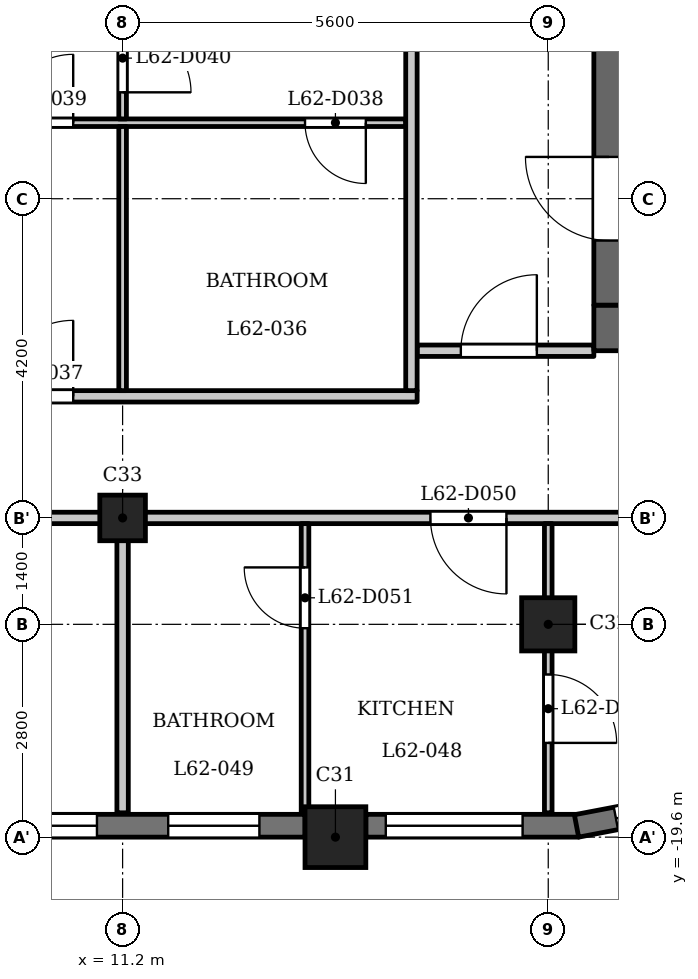
"""IFC4 building model, lengths in metres.
Left out: names, types, materials, properties, quantities, classifications, styles, units other than length and angle.
Written with IfcOpenShell. Run it as: python <this file> out.ifc"""

import sys

from ifc_helpers import new_model, si_unit, direction, frame, frame_2d, origin, origin_2d, place, context, subcontext, project, spatial, rectangle, extrude, element, fill, save


model = new_model("IFC4")
c1 = context("Model", 3, precision=1e-05, world=origin(), true_north=direction((0.0, 1.0)))
c2 = subcontext(c1, "Body", "Model", "MODEL_VIEW")
j1 = project(units=[si_unit("LENGTHUNIT", "METRE"), si_unit("PLANEANGLEUNIT", "RADIAN")], contexts=[c1])
p1 = place(None, origin())
s1 = spatial("IfcSite", under=j1, at=p1, CompositionType="ELEMENT")
p2 = place(p1, origin())
s2 = spatial("IfcBuilding", under=s1, at=p2, CompositionType="ELEMENT")
p3 = place(p2, frame((0.0, 0.0, 241.7)))
s3 = spatial("IfcBuildingStorey", under=s2, at=p3, CompositionType="ELEMENT", Elevation=241.7)
p4 = place(p3, frame((14.0, -19.6, 0.0), z_axis=(0.0, 0.0, 1.0), x_axis=(1.0, 0.0, 0.0)))
e1 = element("IfcColumn", 1, at=p4, inside=s3, PredefinedType="COLUMN", context=c2, shape_type="SweptSolid", body=[
    extrude(rectangle(XDim=0.8, YDim=0.8, at=origin_2d()), origin(), (0.0, 0.0, 1.0), 3.5),
])
p5 = place(p3, frame((16.8, -16.8, 0.0), z_axis=(0.0, 0.0, 1.0), x_axis=(1.0, 0.0, 0.0)))
e2 = element("IfcColumn", 2, at=p5, inside=s3, PredefinedType="COLUMN", context=c2, shape_type="SweptSolid", body=[
    extrude(rectangle(XDim=0.7, YDim=0.7, at=origin_2d()), origin(), (0.0, 0.0, 1.0), 3.5),
])
p6 = place(p3, frame((11.2, -15.4, 0.0), z_axis=(0.0, 0.0, 1.0), x_axis=(1.0, 0.0, 0.0)))
e3 = element("IfcColumn", 3, at=p6, inside=s3, PredefinedType="COLUMN", context=c2, shape_type="SweptSolid", body=[
    extrude(rectangle(XDim=0.6, YDim=0.6, at=origin_2d()), origin(), (0.0, 0.0, 1.0), 3.5),
])
p7 = place(p3, frame((8.8, -19.45, 0.0), z_axis=(0.0, 0.0, 1.0), x_axis=(1.0, 0.0, 0.0)))
e4 = element("IfcWall", 4, at=p7, inside=s3, PredefinedType="SOLIDWALL", context=c2, shape_type="SweptSolid", body=[
    extrude(rectangle(XDim=4.8, YDim=0.3, at=frame_2d((2.4, 0.0))), origin(), (0.0, 0.0, 1.0), 2.55),
])
p8 = place(p7, frame((0.262, 0.0, 0.9)))
e5 = element("IfcOpeningElement", 5, at=p8, cuts=e4, PredefinedType="OPENING", context=c2, shape_type="SweptSolid", body=[
    extrude(rectangle(XDim=1.8, YDim=1.25, at=frame_2d((0.9, 0.625))), frame((0.0, 0.16, 0.0), z_axis=(0.0, -1.0, 0.0), x_axis=(1.0, 0.0, 0.0)), (0.0, 0.0, 1.0), 0.32),
])
p9 = place(p7, frame((3.0, 0.0, 0.6)))
e6 = element("IfcOpeningElement", 6, at=p9, cuts=e4, PredefinedType="OPENING", context=c2, shape_type="SweptSolid", body=[
    extrude(rectangle(XDim=1.2, YDim=1.55, at=frame_2d((0.6, 0.775))), frame((0.0, 0.16, 0.0), z_axis=(0.0, -1.0, 0.0), x_axis=(1.0, 0.0, 0.0)), (0.0, 0.0, 1.0), 0.32),
])
p10 = place(p3, frame((14.4, -19.45, 0.0), z_axis=(0.0, 0.0, 1.0), x_axis=(1.0, 0.0, 0.0)))
e7 = element("IfcWall", 7, at=p10, inside=s3, PredefinedType="SOLIDWALL", context=c2, shape_type="SweptSolid", body=[
    extrude(rectangle(XDim=2.8, YDim=0.3, at=frame_2d((1.4, 0.0))), origin(), (0.0, 0.0, 1.0), 2.55),
])
p11 = place(p10, frame((0.262, 0.0, 0.9)))
e8 = element("IfcOpeningElement", 8, at=p11, cuts=e7, PredefinedType="OPENING", context=c2, shape_type="SweptSolid", body=[
    extrude(rectangle(XDim=1.8, YDim=1.25, at=frame_2d((0.9, 0.625))), frame((0.0, 0.16, 0.0), z_axis=(0.0, -1.0, 0.0), x_axis=(1.0, 0.0, 0.0)), (0.0, 0.0, 1.0), 0.32),
])
p12 = place(p3, frame((17.172, -19.453, 0.0), z_axis=(0.0, 0.0, 1.0), x_axis=(0.982301706131, 0.187305520826, 0.0)))
e9 = element("IfcWall", 9, at=p12, inside=s3, PredefinedType="SOLIDWALL", context=c2, shape_type="SweptSolid", body=[
    extrude(rectangle(XDim=1.856, YDim=0.3, at=frame_2d((0.928, 0.0))), origin(), (0.0, 0.0, 1.0), 2.55),
])
p13 = place(p12, frame((0.528, 0.0, 0.6)))
e10 = element("IfcOpeningElement", 10, at=p13, cuts=e9, PredefinedType="OPENING", context=c2, shape_type="SweptSolid", body=[
    extrude(rectangle(XDim=0.8, YDim=1.55, at=frame_2d((0.4, 0.775))), frame((0.0, 0.16, 0.0), z_axis=(0.0, -1.0, 0.0), x_axis=(1.0, 0.0, 0.0)), (0.0, 0.0, 1.0), 0.32),
])
p14 = place(p3, frame((17.4, -12.9, 0.0), z_axis=(0.0, 0.0, 1.0), x_axis=(1.0, 0.0, 0.0)))
e11 = element("IfcWall", 11, at=p14, inside=s3, PredefinedType="SHEAR", context=c2, shape_type="SweptSolid", body=[
    extrude(rectangle(XDim=7.32, YDim=0.6, at=frame_2d((3.66, 0.0))), origin(), (0.0, 0.0, 1.0), 3.2),
])
p15 = place(p3, frame((17.6, -12.6, 0.0), z_axis=(0.0, 0.0, 1.0), x_axis=(0.0, 1.0, 0.0)))
e12 = element("IfcWall", 12, at=p15, inside=s3, PredefinedType="SHEAR", context=c2, shape_type="SweptSolid", body=[
    extrude(rectangle(XDim=25.2, YDim=0.4, at=frame_2d((12.6, 0.0))), origin(), (0.0, 0.0, 1.0), 3.2),
])
p16 = place(p15, frame((6.3, 0.0, 0.0)))
e13 = element("IfcOpeningElement", 13, at=p16, cuts=e12, PredefinedType="OPENING", context=c2, shape_type="SweptSolid", body=[
    extrude(rectangle(XDim=1.1, YDim=2.1, at=frame_2d((0.55, 1.05))), frame((0.0, 0.21, 0.0), z_axis=(0.0, -1.0, 0.0), x_axis=(1.0, 0.0, 0.0)), (0.0, 0.0, 1.0), 0.42),
])
p17 = place(p15, frame((8.7, 0.0, 0.0)))
e14 = element("IfcOpeningElement", 14, at=p17, cuts=e12, PredefinedType="OPENING", context=c2, shape_type="SweptSolid", body=[
    extrude(rectangle(XDim=1.1, YDim=2.1, at=frame_2d((0.55, 1.05))), frame((0.0, 0.21, 0.0), z_axis=(0.0, -1.0, 0.0), x_axis=(1.0, 0.0, 0.0)), (0.0, 0.0, 1.0), 0.42),
])
p18 = place(p15, frame((11.2, 0.0, 0.0)))
e15 = element("IfcOpeningElement", 15, at=p18, cuts=e12, PredefinedType="OPENING", context=c2, shape_type="SweptSolid", body=[
    extrude(rectangle(XDim=0.9, YDim=2.1, at=frame_2d((0.45, 1.05))), frame((0.0, 0.21, 0.0), z_axis=(0.0, -1.0, 0.0), x_axis=(1.0, 0.0, 0.0)), (0.0, 0.0, 1.0), 0.42),
])
p19 = place(p15, frame((15.75, 0.0, 0.0)))
e16 = element("IfcOpeningElement", 16, at=p19, cuts=e12, PredefinedType="OPENING", context=c2, shape_type="SweptSolid", body=[
    extrude(rectangle(XDim=1.1, YDim=2.1, at=frame_2d((0.55, 1.05))), frame((0.0, 0.21, 0.0), z_axis=(0.0, -1.0, 0.0), x_axis=(1.0, 0.0, 0.0)), (0.0, 0.0, 1.0), 0.42),
])
p20 = place(p15, frame((18.15, 0.0, 0.0)))
e17 = element("IfcOpeningElement", 17, at=p20, cuts=e12, PredefinedType="OPENING", context=c2, shape_type="SweptSolid", body=[
    extrude(rectangle(XDim=1.1, YDim=2.1, at=frame_2d((0.55, 1.05))), frame((0.0, 0.21, 0.0), z_axis=(0.0, -1.0, 0.0), x_axis=(1.0, 0.0, 0.0)), (0.0, 0.0, 1.0), 0.42),
])
p21 = place(p15, frame((23.25, 0.0, 0.0)))
e18 = element("IfcOpeningElement", 18, at=p21, cuts=e12, PredefinedType="OPENING", context=c2, shape_type="SweptSolid", body=[
    extrude(rectangle(XDim=1.1, YDim=2.1, at=frame_2d((0.55, 1.05))), frame((0.0, 0.21, 0.0), z_axis=(0.0, -1.0, 0.0), x_axis=(1.0, 0.0, 0.0)), (0.0, 0.0, 1.0), 0.42),
])
p22 = place(p15, frame((0.85, 0.0, 0.0)))
e19 = element("IfcOpeningElement", 19, at=p22, cuts=e12, PredefinedType="OPENING", context=c2, shape_type="SweptSolid", body=[
    extrude(rectangle(XDim=1.1, YDim=2.1, at=frame_2d((0.55, 1.05))), frame((0.0, 0.21, 0.0), z_axis=(0.0, -1.0, 0.0), x_axis=(1.0, 0.0, 0.0)), (0.0, 0.0, 1.0), 0.42),
])
p23 = place(p15, frame((13.075, 0.0, 0.0)))
e20 = element("IfcOpeningElement", 20, at=p23, cuts=e12, PredefinedType="OPENING", context=c2, shape_type="SweptSolid", body=[
    extrude(rectangle(XDim=1.8, YDim=2.1, at=frame_2d((0.9, 1.05))), frame((0.0, 0.21, 0.0), z_axis=(0.0, -1.0, 0.0), x_axis=(1.0, 0.0, 0.0)), (0.0, 0.0, 1.0), 0.42),
])
p24 = place(p3, frame((-23.322, -15.4, 0.0), z_axis=(0.0, 0.0, 1.0), x_axis=(1.0, 0.0, 0.0)))
e21 = element("IfcWall", 21, at=p24, inside=s3, PredefinedType="PARTITIONING", context=c2, shape_type="SweptSolid", body=[
    extrude(rectangle(XDim=46.872, YDim=0.15, at=frame_2d((23.436, 0.0))), origin(), (0.0, 0.0, 1.0), 3.2),
])
p25 = place(p24, frame((7.172, 0.0, 0.0)))
e22 = element("IfcOpeningElement", 22, at=p25, cuts=e21, PredefinedType="OPENING", context=c2, shape_type="SweptSolid", body=[
    extrude(rectangle(XDim=1.0, YDim=2.1, at=frame_2d((0.5, 1.05))), frame((0.0, 0.085, 0.0), z_axis=(0.0, -1.0, 0.0), x_axis=(1.0, 0.0, 0.0)), (0.0, 0.0, 1.0), 0.17),
])
p26 = place(p24, frame((16.172, 0.0, 0.0)))
e23 = element("IfcOpeningElement", 23, at=p26, cuts=e21, PredefinedType="OPENING", context=c2, shape_type="SweptSolid", body=[
    extrude(rectangle(XDim=1.0, YDim=2.1, at=frame_2d((0.5, 1.05))), frame((0.0, 0.085, 0.0), z_axis=(0.0, -1.0, 0.0), x_axis=(1.0, 0.0, 0.0)), (0.0, 0.0, 1.0), 0.17),
])
p27 = place(p24, frame((26.372, 0.0, 0.0)))
e24 = element("IfcOpeningElement", 24, at=p27, cuts=e21, PredefinedType="OPENING", context=c2, shape_type="SweptSolid", body=[
    extrude(rectangle(XDim=1.0, YDim=2.1, at=frame_2d((0.5, 1.05))), frame((0.0, 0.085, 0.0), z_axis=(0.0, -1.0, 0.0), x_axis=(1.0, 0.0, 0.0)), (0.0, 0.0, 1.0), 0.17),
])
p28 = place(p24, frame((38.572, 0.0, 0.0)))
e25 = element("IfcOpeningElement", 25, at=p28, cuts=e21, PredefinedType="OPENING", context=c2, shape_type="SweptSolid", body=[
    extrude(rectangle(XDim=1.0, YDim=2.1, at=frame_2d((0.5, 1.05))), frame((0.0, 0.085, 0.0), z_axis=(0.0, -1.0, 0.0), x_axis=(1.0, 0.0, 0.0)), (0.0, 0.0, 1.0), 0.17),
])
p29 = place(p3, frame((-15.075, -13.8, 0.0), z_axis=(0.0, 0.0, 1.0), x_axis=(1.0, 0.0, 0.0)))
e26 = element("IfcWall", 26, at=p29, inside=s3, PredefinedType="PARTITIONING", context=c2, shape_type="SweptSolid", body=[
    extrude(rectangle(XDim=30.15, YDim=0.15, at=frame_2d((15.075, 0.0))), origin(), (0.0, 0.0, 1.0), 3.2),
])
p30 = place(p29, frame((2.225, 0.0, 0.0)))
e27 = element("IfcOpeningElement", 27, at=p30, cuts=e26, PredefinedType="OPENING", context=c2, shape_type="SweptSolid", body=[
    extrude(rectangle(XDim=1.0, YDim=2.1, at=frame_2d((0.5, 1.05))), frame((0.0, 0.085, 0.0), z_axis=(0.0, -1.0, 0.0), x_axis=(1.0, 0.0, 0.0)), (0.0, 0.0, 1.0), 0.17),
])
p31 = place(p29, frame((13.425, 0.0, 0.0)))
e28 = element("IfcOpeningElement", 28, at=p31, cuts=e26, PredefinedType="OPENING", context=c2, shape_type="SweptSolid", body=[
    extrude(rectangle(XDim=1.0, YDim=2.1, at=frame_2d((0.5, 1.05))), frame((0.0, 0.085, 0.0), z_axis=(0.0, -1.0, 0.0), x_axis=(1.0, 0.0, 0.0)), (0.0, 0.0, 1.0), 0.17),
])
p32 = place(p29, frame((24.625, 0.0, 0.0)))
e29 = element("IfcOpeningElement", 29, at=p32, cuts=e26, PredefinedType="OPENING", context=c2, shape_type="SweptSolid", body=[
    extrude(rectangle(XDim=1.0, YDim=2.1, at=frame_2d((0.5, 1.05))), frame((0.0, 0.085, 0.0), z_axis=(0.0, -1.0, 0.0), x_axis=(1.0, 0.0, 0.0)), (0.0, 0.0, 1.0), 0.17),
])
p33 = place(p3, frame((15.075, -13.2, 0.0), z_axis=(0.0, 0.0, 1.0), x_axis=(1.0, 0.0, 0.0)))
e30 = element("IfcWall", 30, at=p33, inside=s3, PredefinedType="PARTITIONING", context=c2, shape_type="SweptSolid", body=[
    extrude(rectangle(XDim=2.325, YDim=0.15, at=frame_2d((1.163, 0.0))), origin(), (0.0, 0.0, 1.0), 3.2),
])
p34 = place(p33, frame((0.575, 0.0, 0.0)))
e31 = element("IfcOpeningElement", 31, at=p34, cuts=e30, PredefinedType="OPENING", context=c2, shape_type="SweptSolid", body=[
    extrude(rectangle(XDim=1.0, YDim=2.1, at=frame_2d((0.5, 1.05))), frame((0.0, 0.085, 0.0), z_axis=(0.0, -1.0, 0.0), x_axis=(1.0, 0.0, 0.0)), (0.0, 0.0, 1.0), 0.17),
])
p35 = place(p3, frame((-14.925, -10.2, 0.0), z_axis=(0.0, 0.0, 1.0), x_axis=(1.0, 0.0, 0.0)))
e32 = element("IfcWall", 32, at=p35, inside=s3, PredefinedType="PARTITIONING", context=c2, shape_type="SweptSolid", body=[
    extrude(rectangle(XDim=29.85, YDim=0.1, at=frame_2d((14.925, 0.0))), origin(), (0.0, 0.0, 1.0), 3.2),
])
p36 = place(p35, frame((7.875, 0.0, 0.0)))
e33 = element("IfcOpeningElement", 33, at=p36, cuts=e32, PredefinedType="OPENING", context=c2, shape_type="SweptSolid", body=[
    extrude(rectangle(XDim=0.8, YDim=2.1, at=frame_2d((0.4, 1.05))), frame((0.0, 0.06, 0.0), z_axis=(0.0, -1.0, 0.0), x_axis=(1.0, 0.0, 0.0)), (0.0, 0.0, 1.0), 0.12),
])
p37 = place(p35, frame((2.175, 0.0, 0.0)))
e34 = element("IfcOpeningElement", 34, at=p37, cuts=e32, PredefinedType="OPENING", context=c2, shape_type="SweptSolid", body=[
    extrude(rectangle(XDim=0.9, YDim=2.1, at=frame_2d((0.45, 1.05))), frame((0.0, 0.06, 0.0), z_axis=(0.0, -1.0, 0.0), x_axis=(1.0, 0.0, 0.0)), (0.0, 0.0, 1.0), 0.12),
])
p38 = place(p35, frame((19.075, 0.0, 0.0)))
e35 = element("IfcOpeningElement", 35, at=p38, cuts=e32, PredefinedType="OPENING", context=c2, shape_type="SweptSolid", body=[
    extrude(rectangle(XDim=0.8, YDim=2.1, at=frame_2d((0.4, 1.05))), frame((0.0, 0.06, 0.0), z_axis=(0.0, -1.0, 0.0), x_axis=(1.0, 0.0, 0.0)), (0.0, 0.0, 1.0), 0.12),
])
p39 = place(p35, frame((13.375, 0.0, 0.0)))
e36 = element("IfcOpeningElement", 36, at=p39, cuts=e32, PredefinedType="OPENING", context=c2, shape_type="SweptSolid", body=[
    extrude(rectangle(XDim=0.9, YDim=2.1, at=frame_2d((0.45, 1.05))), frame((0.0, 0.06, 0.0), z_axis=(0.0, -1.0, 0.0), x_axis=(1.0, 0.0, 0.0)), (0.0, 0.0, 1.0), 0.12),
])
p40 = place(p35, frame((28.525, 0.0, 0.0)))
e37 = element("IfcOpeningElement", 37, at=p40, cuts=e32, PredefinedType="OPENING", context=c2, shape_type="SweptSolid", body=[
    extrude(rectangle(XDim=0.8, YDim=2.1, at=frame_2d((0.4, 1.05))), frame((0.0, 0.06, 0.0), z_axis=(0.0, -1.0, 0.0), x_axis=(1.0, 0.0, 0.0)), (0.0, 0.0, 1.0), 0.12),
])
p41 = place(p35, frame((24.575, 0.0, 0.0)))
e38 = element("IfcOpeningElement", 38, at=p41, cuts=e32, PredefinedType="OPENING", context=c2, shape_type="SweptSolid", body=[
    extrude(rectangle(XDim=0.9, YDim=2.1, at=frame_2d((0.45, 1.05))), frame((0.0, 0.06, 0.0), z_axis=(0.0, -1.0, 0.0), x_axis=(1.0, 0.0, 0.0)), (0.0, 0.0, 1.0), 0.12),
])
p42 = place(p3, frame((11.2, -13.725, 0.0), z_axis=(0.0, 0.0, 1.0), x_axis=(0.0, 1.0, 0.0)))
e39 = element("IfcWall", 39, at=p42, inside=s3, PredefinedType="PARTITIONING", context=c2, shape_type="SweptSolid", body=[
    extrude(rectangle(XDim=3.475, YDim=0.1, at=frame_2d((1.738, 0.0))), origin(), (0.0, 0.0, 1.0), 3.2),
])
p43 = place(p3, frame((11.2, -10.15, 0.0), z_axis=(0.0, 0.0, 1.0), x_axis=(0.0, 1.0, 0.0)))
e40 = element("IfcWall", 40, at=p43, inside=s3, PredefinedType="PARTITIONING", context=c2, shape_type="SweptSolid", body=[
    extrude(rectangle(XDim=2.83, YDim=0.1, at=frame_2d((1.415, 0.0))), origin(), (0.0, 0.0, 1.0), 3.2),
])
p44 = place(p43, frame((0.35, 0.0, 0.0)))
e41 = element("IfcOpeningElement", 41, at=p44, cuts=e40, PredefinedType="OPENING", context=c2, shape_type="SweptSolid", body=[
    extrude(rectangle(XDim=0.9, YDim=2.1, at=frame_2d((0.45, 1.05))), frame((0.0, 0.06, 0.0), z_axis=(0.0, -1.0, 0.0), x_axis=(1.0, 0.0, 0.0)), (0.0, 0.0, 1.0), 0.12),
])
p45 = place(p3, frame((11.2, -19.28, 0.0), z_axis=(0.0, 0.0, 1.0), x_axis=(0.0, 1.0, 0.0)))
e42 = element("IfcWall", 42, at=p45, inside=s3, PredefinedType="PARTITIONING", context=c2, shape_type="SweptSolid", body=[
    extrude(rectangle(XDim=3.805, YDim=0.15, at=frame_2d((1.902, 0.0))), origin(), (0.0, 0.0, 1.0), 3.2),
])
p46 = place(p3, frame((13.6, -19.28, 0.0), z_axis=(0.0, 0.0, 1.0), x_axis=(0.0, 1.0, 0.0)))
e43 = element("IfcWall", 43, at=p46, inside=s3, PredefinedType="PARTITIONING", context=c2, shape_type="SweptSolid", body=[
    extrude(rectangle(XDim=3.805, YDim=0.1, at=frame_2d((1.902, 0.0))), origin(), (0.0, 0.0, 1.0), 3.2),
])
p47 = place(p46, frame((2.429, 0.0, 0.0)))
e44 = element("IfcOpeningElement", 44, at=p47, cuts=e43, PredefinedType="OPENING", context=c2, shape_type="SweptSolid", body=[
    extrude(rectangle(XDim=0.8, YDim=2.1, at=frame_2d((0.4, 1.05))), frame((0.0, 0.06, 0.0), z_axis=(0.0, -1.0, 0.0), x_axis=(1.0, 0.0, 0.0)), (0.0, 0.0, 1.0), 0.12),
])
p48 = place(p3, frame((15.0, -13.725, 0.0), z_axis=(0.0, 0.0, 1.0), x_axis=(0.0, 1.0, 0.0)))
e45 = element("IfcWall", 45, at=p48, inside=s3, PredefinedType="PARTITIONING", context=c2, shape_type="SweptSolid", body=[
    extrude(rectangle(XDim=6.956, YDim=0.15, at=frame_2d((3.478, 0.0))), origin(), (0.0, 0.0, 1.0), 3.2),
])
p49 = place(p3, frame((16.8, -19.28, 0.0), z_axis=(0.0, 0.0, 1.0), x_axis=(0.0, 1.0, 0.0)))
e46 = element("IfcWall", 46, at=p49, inside=s3, PredefinedType="PARTITIONING", context=c2, shape_type="SweptSolid", body=[
    extrude(rectangle(XDim=3.805, YDim=0.1, at=frame_2d((1.902, 0.0))), origin(), (0.0, 0.0, 1.0), 3.2),
])
p50 = place(p49, frame((0.92, 0.0, 0.0)))
e47 = element("IfcOpeningElement", 47, at=p50, cuts=e46, PredefinedType="OPENING", context=c2, shape_type="SweptSolid", body=[
    extrude(rectangle(XDim=0.9, YDim=2.1, at=frame_2d((0.45, 1.05))), frame((0.0, 0.06, 0.0), z_axis=(0.0, -1.0, 0.0), x_axis=(1.0, 0.0, 0.0)), (0.0, 0.0, 1.0), 0.12),
])
p51 = place(p22, origin())
e48 = element("IfcDoor", 48, at=p51, inside=s3, OperationType="SINGLE_SWING_LEFT", PredefinedType="DOOR", context=c2, shape_type="SweptSolid", body=[
    extrude(rectangle(XDim=1.1, YDim=2.1, at=frame_2d((0.55, 1.05))), frame((0.0, 0.025, 0.0), z_axis=(0.0, -1.0, 0.0), x_axis=(1.0, 0.0, 0.0)), (0.0, 0.0, 1.0), 0.05),
])
fill(e19, e48)
p52 = place(p34, origin())
e49 = element("IfcDoor", 49, at=p52, inside=s3, OperationType="SINGLE_SWING_LEFT", PredefinedType="DOOR", context=c2, shape_type="SweptSolid", body=[
    extrude(rectangle(XDim=1.0, YDim=2.1, at=frame_2d((0.5, 1.05))), frame((0.0, 0.025, 0.0), z_axis=(0.0, -1.0, 0.0), x_axis=(1.0, 0.0, 0.0)), (0.0, 0.0, 1.0), 0.05),
])
fill(e31, e49)
p53 = place(p32, origin())
e50 = element("IfcDoor", 50, at=p53, inside=s3, OperationType="SINGLE_SWING_LEFT", PredefinedType="DOOR", context=c2, shape_type="SweptSolid", body=[
    extrude(rectangle(XDim=1.0, YDim=2.1, at=frame_2d((0.5, 1.05))), frame((0.0, 0.025, 0.0), z_axis=(0.0, -1.0, 0.0), x_axis=(1.0, 0.0, 0.0)), (0.0, 0.0, 1.0), 0.05),
])
fill(e29, e50)
p54 = place(p40, origin())
e51 = element("IfcDoor", 51, at=p54, inside=s3, OperationType="SINGLE_SWING_RIGHT", PredefinedType="DOOR", context=c2, shape_type="SweptSolid", body=[
    extrude(rectangle(XDim=0.8, YDim=2.1, at=frame_2d((0.4, 1.05))), frame((0.0, 0.025, 0.0), z_axis=(0.0, -1.0, 0.0), x_axis=(1.0, 0.0, 0.0)), (0.0, 0.0, 1.0), 0.05),
])
fill(e37, e51)
p55 = place(p41, origin())
e52 = element("IfcDoor", 52, at=p55, inside=s3, OperationType="SINGLE_SWING_LEFT", PredefinedType="DOOR", context=c2, shape_type="SweptSolid", body=[
    extrude(rectangle(XDim=0.9, YDim=2.1, at=frame_2d((0.45, 1.05))), frame((0.0, 0.025, 0.0), z_axis=(0.0, -1.0, 0.0), x_axis=(1.0, 0.0, 0.0)), (0.0, 0.0, 1.0), 0.05),
])
fill(e38, e52)
p56 = place(p44, origin())
e53 = element("IfcDoor", 53, at=p56, inside=s3, OperationType="SINGLE_SWING_LEFT", PredefinedType="DOOR", context=c2, shape_type="SweptSolid", body=[
    extrude(rectangle(XDim=0.9, YDim=2.1, at=frame_2d((0.45, 1.05))), frame((0.0, 0.025, 0.0), z_axis=(0.0, -1.0, 0.0), x_axis=(1.0, 0.0, 0.0)), (0.0, 0.0, 1.0), 0.05),
])
fill(e41, e53)
p57 = place(p28, origin())
e54 = element("IfcDoor", 54, at=p57, inside=s3, OperationType="SINGLE_SWING_RIGHT", PredefinedType="DOOR", context=c2, shape_type="SweptSolid", body=[
    extrude(rectangle(XDim=1.0, YDim=2.1, at=frame_2d((0.5, 1.05))), frame((0.0, 0.025, 0.0), z_axis=(0.0, -1.0, 0.0), x_axis=(1.0, 0.0, 0.0)), (0.0, 0.0, 1.0), 0.05),
])
fill(e25, e54)
p58 = place(p47, origin())
e55 = element("IfcDoor", 55, at=p58, inside=s3, OperationType="SINGLE_SWING_LEFT", PredefinedType="DOOR", context=c2, shape_type="SweptSolid", body=[
    extrude(rectangle(XDim=0.8, YDim=2.1, at=frame_2d((0.4, 1.05))), frame((0.0, 0.025, 0.0), z_axis=(0.0, -1.0, 0.0), x_axis=(1.0, 0.0, 0.0)), (0.0, 0.0, 1.0), 0.05),
])
fill(e44, e55)
p59 = place(p50, origin())
e56 = element("IfcDoor", 56, at=p59, inside=s3, OperationType="SINGLE_SWING_LEFT", PredefinedType="DOOR", context=c2, shape_type="SweptSolid", body=[
    extrude(rectangle(XDim=0.9, YDim=2.1, at=frame_2d((0.45, 1.05))), frame((0.0, 0.025, 0.0), z_axis=(0.0, -1.0, 0.0), x_axis=(1.0, 0.0, 0.0)), (0.0, 0.0, 1.0), 0.05),
])
fill(e47, e56)
p60 = place(p8, origin())
e57 = element("IfcWindow", 57, at=p60, inside=s3, PartitioningType="SINGLE_PANEL", PredefinedType="WINDOW", context=c2, shape_type="SweptSolid", body=[
    extrude(rectangle(XDim=1.8, YDim=1.25, at=frame_2d((0.9, 0.625))), frame((0.0, 0.03, 0.0), z_axis=(0.0, -1.0, 0.0), x_axis=(1.0, 0.0, 0.0)), (0.0, 0.0, 1.0), 0.06),
])
fill(e5, e57)
p61 = place(p9, origin())
e58 = element("IfcWindow", 58, at=p61, inside=s3, PartitioningType="SINGLE_PANEL", PredefinedType="WINDOW", context=c2, shape_type="SweptSolid", body=[
    extrude(rectangle(XDim=1.2, YDim=1.55, at=frame_2d((0.6, 0.775))), frame((0.0, 0.03, 0.0), z_axis=(0.0, -1.0, 0.0), x_axis=(1.0, 0.0, 0.0)), (0.0, 0.0, 1.0), 0.06),
])
fill(e6, e58)
p62 = place(p11, origin())
e59 = element("IfcWindow", 59, at=p62, inside=s3, PartitioningType="SINGLE_PANEL", PredefinedType="WINDOW", context=c2, shape_type="SweptSolid", body=[
    extrude(rectangle(XDim=1.8, YDim=1.25, at=frame_2d((0.9, 0.625))), frame((0.0, 0.03, 0.0), z_axis=(0.0, -1.0, 0.0), x_axis=(1.0, 0.0, 0.0)), (0.0, 0.0, 1.0), 0.06),
])
fill(e8, e59)
p63 = place(p13, origin())
e60 = element("IfcWindow", 60, at=p63, inside=s3, PartitioningType="SINGLE_PANEL", PredefinedType="WINDOW", context=c2, shape_type="SweptSolid", body=[
    extrude(rectangle(XDim=0.8, YDim=1.55, at=frame_2d((0.4, 0.775))), frame((0.0, 0.03, 0.0), z_axis=(0.0, -1.0, 0.0), x_axis=(1.0, 0.0, 0.0)), (0.0, 0.0, 1.0), 0.06),
])
fill(e10, e60)
save(model, sys.argv[1])
